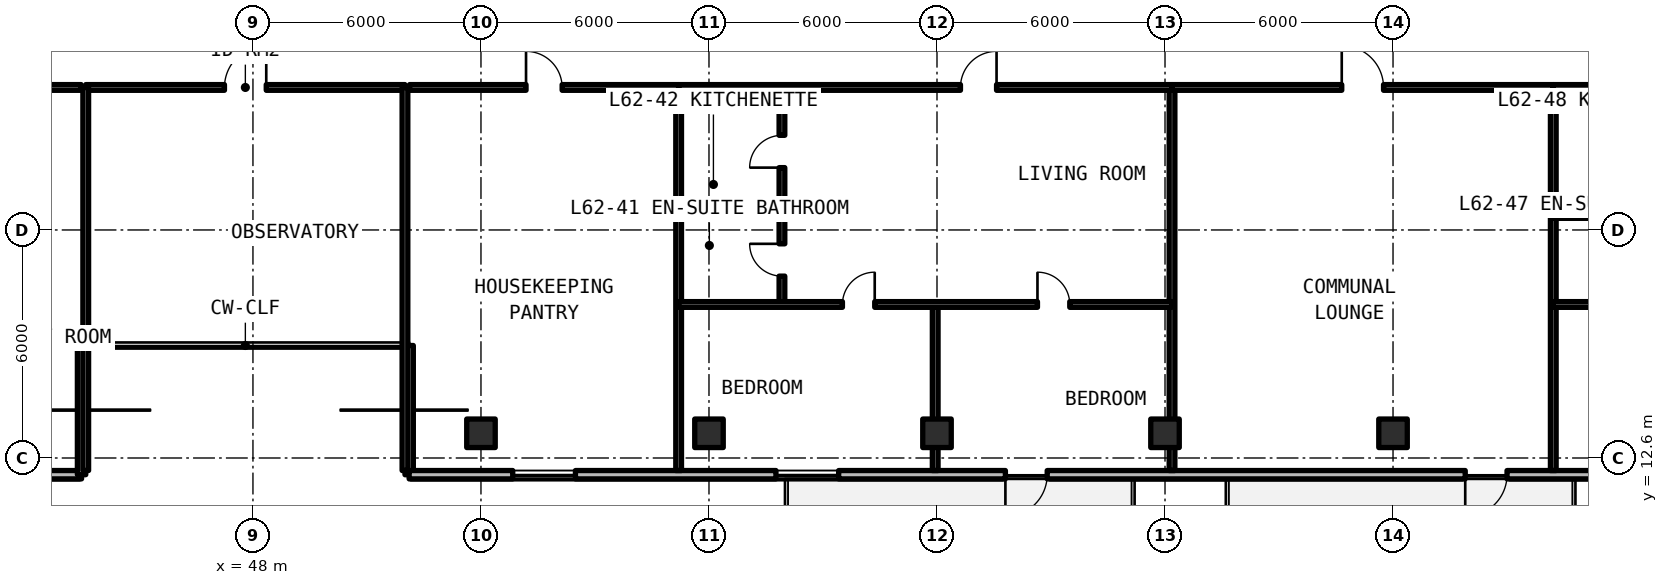
"""IFC4 building model, lengths in metres.
Left out: names, types, materials, properties, quantities, classifications, styles, units other than length and angle.
Written with IfcOpenShell. Run it as: python <this file> out.ifc"""

import sys

from ifc_helpers import new_model, si_unit, direction, frame, frame_2d, origin, origin_2d, place, context, subcontext, project, spatial, rectangle, extrude, element, fill, save


model = new_model("IFC4")
c1 = context("Model", 3, precision=1e-05, world=origin(), true_north=direction((0.0, 1.0)))
c2 = subcontext(c1, "Body", "Model", "MODEL_VIEW")
j1 = project(units=[si_unit("LENGTHUNIT", "METRE"), si_unit("PLANEANGLEUNIT", "RADIAN")], contexts=[c1])
p1 = place(None, origin())
s1 = spatial("IfcSite", under=j1, at=p1, CompositionType="ELEMENT")
p2 = place(p1, origin())
s2 = spatial("IfcBuilding", under=s1, at=p2, CompositionType="ELEMENT")
p3 = place(p2, frame((0.0, 0.0, 222.75)))
s3 = spatial("IfcBuildingStorey", under=s2, at=p3, CompositionType="ELEMENT", Elevation=222.75)
for number, where, z_axis, x_axis in (
    (1, (54.0, 13.25, 0.0), (0.0, 0.0, 1.0), (1.0, 0.0, 0.0)),
    (2, (60.0, 13.25, 0.0), (0.0, 0.0, 1.0), (1.0, 0.0, 0.0)),
    (3, (66.0, 13.25, 0.0), (0.0, 0.0, 1.0), (1.0, 0.0, 0.0)),
    (4, (72.0, 13.25, 0.0), (0.0, 0.0, 1.0), (1.0, 0.0, 0.0)),
    (5, (78.0, 13.25, 0.0), (0.0, 0.0, 1.0), (1.0, 0.0, 0.0)),
):
    element("IfcColumn", number, at=place(p3, frame(where, z_axis=z_axis, x_axis=x_axis)), inside=s3, PredefinedType="COLUMN", context=c2, shape_type="SweptSolid", body=[
        extrude(rectangle(XDim=0.75, YDim=0.75, at=origin_2d()), origin(), (0.0, 0.0, 1.0), 3.3),
    ])
p4 = place(p3, frame((25.846, 12.16, 0.0), z_axis=(0.0, 0.0, 1.0), x_axis=(1.0, 0.0, 0.0)))
e6 = element("IfcWall", 6, at=p4, inside=s3, PredefinedType="SOLIDWALL", context=c2, shape_type="SweptSolid", body=[
    extrude(rectangle(XDim=17.644, YDim=0.22, at=frame_2d((8.822, 0.0))), origin(), (0.0, 0.0, 1.0), 3.08),
])
p5 = place(p4, frame((5.904, 0.0, 0.0)))
e7 = element("IfcOpeningElement", 7, at=p5, cuts=e6, PredefinedType="OPENING", context=c2, shape_type="SweptSolid", body=[
    extrude(rectangle(XDim=1.1, YDim=2.15, at=frame_2d((0.55, 1.075))), frame((0.0, 0.12, 0.0), z_axis=(0.0, -1.0, 0.0), x_axis=(1.0, 0.0, 0.0)), (0.0, 0.0, 1.0), 0.24),
])
p6 = place(p4, frame((1.261, 0.0, 0.78)))
e8 = element("IfcOpeningElement", 8, at=p6, cuts=e6, PredefinedType="OPENING", context=c2, shape_type="SweptSolid", body=[
    extrude(rectangle(XDim=1.65, YDim=1.66, at=frame_2d((0.825, 0.83))), frame((0.0, 0.12, 0.0), z_axis=(0.0, -1.0, 0.0), x_axis=(1.0, 0.0, 0.0)), (0.0, 0.0, 1.0), 0.24),
])
p7 = place(p4, frame((11.45, 0.0, 0.78)))
e9 = element("IfcOpeningElement", 9, at=p7, cuts=e6, PredefinedType="OPENING", context=c2, shape_type="SweptSolid", body=[
    extrude(rectangle(XDim=1.65, YDim=1.66, at=frame_2d((0.825, 0.83))), frame((0.0, 0.12, 0.0), z_axis=(0.0, -1.0, 0.0), x_axis=(1.0, 0.0, 0.0)), (0.0, 0.0, 1.0), 0.24),
])
p8 = place(p4, frame((14.602, 0.0, 0.78)))
e10 = element("IfcOpeningElement", 10, at=p8, cuts=e6, PredefinedType="OPENING", context=c2, shape_type="SweptSolid", body=[
    extrude(rectangle(XDim=0.85, YDim=1.65, at=frame_2d((0.425, 0.825))), frame((0.0, 0.12, 0.0), z_axis=(0.0, -1.0, 0.0), x_axis=(1.0, 0.0, 0.0)), (0.0, 0.0, 1.0), 0.24),
])
for number, where, z_axis, x_axis in (
    (11, (43.49, 12.16, 0.0), (0.0, 0.0, 1.0), (0.0, 1.0, 0.0)),
    (12, (52.11, 15.56, 0.0), (0.0, 0.0, 1.0), (0.0, -1.0, 0.0)),
):
    element("IfcWall", number, at=place(p3, frame(where, z_axis=z_axis, x_axis=x_axis)), inside=s3, PredefinedType="SOLIDWALL", context=c2, shape_type="SweptSolid", body=[
        extrude(rectangle(XDim=3.4, YDim=0.22, at=frame_2d((1.7, 0.0))), origin(), (0.0, 0.0, 1.0), 3.08),
    ])
p9 = place(p3, frame((52.11, 12.16, 0.0), z_axis=(0.0, 0.0, 1.0), x_axis=(1.0, 0.0, 0.0)))
e13 = element("IfcWall", 13, at=p9, inside=s3, PredefinedType="SOLIDWALL", context=c2, shape_type="SweptSolid", body=[
    extrude(rectangle(XDim=43.244, YDim=0.22, at=frame_2d((21.622, 0.0))), origin(), (0.0, 0.0, 1.0), 3.08),
])
p10 = place(p9, frame((15.69, 0.0, 0.0)))
e14 = element("IfcOpeningElement", 14, at=p10, cuts=e13, PredefinedType="OPENING", context=c2, shape_type="SweptSolid", body=[
    extrude(rectangle(XDim=1.1, YDim=2.15, at=frame_2d((0.55, 1.075))), frame((0.0, 0.12, 0.0), z_axis=(0.0, -1.0, 0.0), x_axis=(1.0, 0.0, 0.0)), (0.0, 0.0, 1.0), 0.24),
])
p11 = place(p9, frame((27.79, 0.0, 0.0)))
e15 = element("IfcOpeningElement", 15, at=p11, cuts=e13, PredefinedType="OPENING", context=c2, shape_type="SweptSolid", body=[
    extrude(rectangle(XDim=1.1, YDim=2.15, at=frame_2d((0.55, 1.075))), frame((0.0, 0.12, 0.0), z_axis=(0.0, -1.0, 0.0), x_axis=(1.0, 0.0, 0.0)), (0.0, 0.0, 1.0), 0.24),
])
p12 = place(p9, frame((2.726, 0.0, 0.78)))
e16 = element("IfcOpeningElement", 16, at=p12, cuts=e13, PredefinedType="OPENING", context=c2, shape_type="SweptSolid", body=[
    extrude(rectangle(XDim=1.65, YDim=1.66, at=frame_2d((0.825, 0.83))), frame((0.0, 0.12, 0.0), z_axis=(0.0, -1.0, 0.0), x_axis=(1.0, 0.0, 0.0)), (0.0, 0.0, 1.0), 0.24),
])
p13 = place(p9, frame((9.652, 0.0, 0.78)))
e17 = element("IfcOpeningElement", 17, at=p13, cuts=e13, PredefinedType="OPENING", context=c2, shape_type="SweptSolid", body=[
    extrude(rectangle(XDim=1.65, YDim=1.66, at=frame_2d((0.825, 0.83))), frame((0.0, 0.12, 0.0), z_axis=(0.0, -1.0, 0.0), x_axis=(1.0, 0.0, 0.0)), (0.0, 0.0, 1.0), 0.24),
])
p14 = place(p9, frame((32.667, 0.0, 0.78)))
e18 = element("IfcOpeningElement", 18, at=p14, cuts=e13, PredefinedType="OPENING", context=c2, shape_type="SweptSolid", body=[
    extrude(rectangle(XDim=1.65, YDim=1.66, at=frame_2d((0.825, 0.83))), frame((0.0, 0.12, 0.0), z_axis=(0.0, -1.0, 0.0), x_axis=(1.0, 0.0, 0.0)), (0.0, 0.0, 1.0), 0.24),
])
p15 = place(p9, frame((39.139, 0.0, 0.78)))
e19 = element("IfcOpeningElement", 19, at=p15, cuts=e13, PredefinedType="OPENING", context=c2, shape_type="SweptSolid", body=[
    extrude(rectangle(XDim=1.65, YDim=1.66, at=frame_2d((0.825, 0.83))), frame((0.0, 0.12, 0.0), z_axis=(0.0, -1.0, 0.0), x_axis=(1.0, 0.0, 0.0)), (0.0, 0.0, 1.0), 0.24),
])
p16 = place(p3, frame((43.6, 22.35, 0.0), z_axis=(0.0, 0.0, 1.0), x_axis=(1.0, 0.0, 0.0)))
e20 = element("IfcWall", 20, at=p16, inside=s3, PredefinedType="SOLIDWALL", context=c2, shape_type="SweptSolid", body=[
    extrude(rectangle(XDim=8.4, YDim=0.15, at=frame_2d((4.2, 0.0))), origin(), (0.0, 0.0, 1.0), 2.35),
])
p17 = place(p16, frame((3.65, 0.0, 0.0)))
e21 = element("IfcOpeningElement", 21, at=p17, cuts=e20, PredefinedType="OPENING", context=c2, shape_type="SweptSolid", body=[
    extrude(rectangle(XDim=1.1, YDim=2.15, at=frame_2d((0.55, 1.075))), frame((0.0, 0.085, 0.0), z_axis=(0.0, -1.0, 0.0), x_axis=(1.0, 0.0, 0.0)), (0.0, 0.0, 1.0), 0.17),
])
for number, where, z_axis, x_axis in (
    (22, (43.6, 12.27, 0.0), (0.0, 0.0, 1.0), (0.0, 1.0, 0.0)),
    (23, (52.0, 12.27, 0.0), (0.0, 0.0, 1.0), (0.0, 1.0, 0.0)),
):
    element("IfcWall", number, at=place(p3, frame(where, z_axis=z_axis, x_axis=x_axis)), inside=s3, PredefinedType="SOLIDWALL", context=c2, shape_type="SweptSolid", body=[
        extrude(rectangle(XDim=10.08, YDim=0.15, at=frame_2d((5.04, 0.0))), origin(), (0.0, 0.0, 1.0), 2.35),
    ])
p18 = place(p3, frame((39.866, 22.35, 0.0), z_axis=(0.0, 0.0, 1.0), x_axis=(1.0, 0.0, 0.0)))
e24 = element("IfcWall", 24, at=p18, inside=s3, PredefinedType="SOLIDWALL", context=c2, shape_type="SweptSolid", body=[
    extrude(rectangle(XDim=3.614, YDim=0.15, at=frame_2d((1.807, 0.0))), origin(), (0.0, 0.0, 1.0), 2.35),
])
p19 = place(p18, frame((1.332, 0.0, 0.0)))
e25 = element("IfcOpeningElement", 25, at=p19, cuts=e24, PredefinedType="OPENING", context=c2, shape_type="SweptSolid", body=[
    extrude(rectangle(XDim=0.95, YDim=2.15, at=frame_2d((0.475, 1.075))), frame((0.0, 0.085, 0.0), z_axis=(0.0, -1.0, 0.0), x_axis=(1.0, 0.0, 0.0)), (0.0, 0.0, 1.0), 0.17),
])
p20 = place(p3, frame((59.202, 12.27, 0.0), z_axis=(0.0, 0.0, 1.0), x_axis=(0.0, 1.0, 0.0)))
e26 = element("IfcWall", 26, at=p20, inside=s3, PredefinedType="SOLIDWALL", context=c2, shape_type="SweptSolid", body=[
    extrude(rectangle(XDim=10.08, YDim=0.15, at=frame_2d((5.04, 0.0))), origin(), (0.0, 0.0, 1.0), 2.35),
])
p21 = place(p3, frame((52.12, 22.35, 0.0), z_axis=(0.0, 0.0, 1.0), x_axis=(1.0, 0.0, 0.0)))
e27 = element("IfcWall", 27, at=p21, inside=s3, PredefinedType="SOLIDWALL", context=c2, shape_type="SweptSolid", body=[
    extrude(rectangle(XDim=7.082, YDim=0.15, at=frame_2d((3.541, 0.0))), origin(), (0.0, 0.0, 1.0), 2.35),
])
p22 = place(p21, frame((3.066, 0.0, 0.0)))
e28 = element("IfcOpeningElement", 28, at=p22, cuts=e27, PredefinedType="OPENING", context=c2, shape_type="SweptSolid", body=[
    extrude(rectangle(XDim=0.95, YDim=2.15, at=frame_2d((0.475, 1.075))), frame((0.0, 0.085, 0.0), z_axis=(0.0, -1.0, 0.0), x_axis=(1.0, 0.0, 0.0)), (0.0, 0.0, 1.0), 0.17),
])
p23 = place(p3, frame((72.185, 12.27, 0.0), z_axis=(0.0, 0.0, 1.0), x_axis=(0.0, 1.0, 0.0)))
e29 = element("IfcWall", 29, at=p23, inside=s3, PredefinedType="SOLIDWALL", context=c2, shape_type="SweptSolid", body=[
    extrude(rectangle(XDim=10.08, YDim=0.15, at=frame_2d((5.04, 0.0))), origin(), (0.0, 0.0, 1.0), 2.35),
])
p24 = place(p3, frame((59.202, 18.981, 0.0), z_axis=(0.0, 0.0, 1.0), x_axis=(1.0, 0.0, 0.0)))
e30 = element("IfcWall", 30, at=p24, inside=s3, PredefinedType="PARTITIONING", context=c2, shape_type="SweptSolid", body=[
    extrude(rectangle(XDim=2.718, YDim=0.15, at=frame_2d((1.359, 0.0))), origin(), (0.0, 0.0, 1.0), 2.35),
])
p25 = place(p3, frame((61.92, 16.64, 0.0), z_axis=(0.0, 0.0, 1.0), x_axis=(0.0, 1.0, 0.0)))
e31 = element("IfcWall", 31, at=p25, inside=s3, PredefinedType="PARTITIONING", context=c2, shape_type="SweptSolid", body=[
    extrude(rectangle(XDim=5.71, YDim=0.15, at=frame_2d((2.855, 0.0))), origin(), (0.0, 0.0, 1.0), 2.35),
])
p26 = place(p25, frame((0.746, 0.0, 0.0)))
e32 = element("IfcOpeningElement", 32, at=p26, cuts=e31, PredefinedType="OPENING", context=c2, shape_type="SweptSolid", body=[
    extrude(rectangle(XDim=0.85, YDim=2.1, at=frame_2d((0.425, 1.05))), frame((0.0, 0.085, 0.0), z_axis=(0.0, -1.0, 0.0), x_axis=(1.0, 0.0, 0.0)), (0.0, 0.0, 1.0), 0.17),
])
p27 = place(p25, frame((3.601, 0.0, 0.0)))
e33 = element("IfcOpeningElement", 33, at=p27, cuts=e31, PredefinedType="OPENING", context=c2, shape_type="SweptSolid", body=[
    extrude(rectangle(XDim=0.85, YDim=2.1, at=frame_2d((0.425, 1.05))), frame((0.0, 0.085, 0.0), z_axis=(0.0, -1.0, 0.0), x_axis=(1.0, 0.0, 0.0)), (0.0, 0.0, 1.0), 0.17),
])
p28 = place(p3, frame((65.953, 12.27, 0.0), z_axis=(0.0, 0.0, 1.0), x_axis=(0.0, 1.0, 0.0)))
e34 = element("IfcWall", 34, at=p28, inside=s3, PredefinedType="PARTITIONING", context=c2, shape_type="SweptSolid", body=[
    extrude(rectangle(XDim=4.37, YDim=0.15, at=frame_2d((2.185, 0.0))), origin(), (0.0, 0.0, 1.0), 2.35),
])
p29 = place(p3, frame((59.202, 16.64, 0.0), z_axis=(0.0, 0.0, 1.0), x_axis=(1.0, 0.0, 0.0)))
e35 = element("IfcWall", 35, at=p29, inside=s3, PredefinedType="PARTITIONING", context=c2, shape_type="SweptSolid", body=[
    extrude(rectangle(XDim=12.983, YDim=0.15, at=frame_2d((6.491, 0.0))), origin(), (0.0, 0.0, 1.0), 2.35),
])
p30 = place(p29, frame((4.31, 0.0, 0.0)))
e36 = element("IfcOpeningElement", 36, at=p30, cuts=e35, PredefinedType="OPENING", context=c2, shape_type="SweptSolid", body=[
    extrude(rectangle(XDim=0.85, YDim=2.1, at=frame_2d((0.425, 1.05))), frame((0.0, 0.085, 0.0), z_axis=(0.0, -1.0, 0.0), x_axis=(1.0, 0.0, 0.0)), (0.0, 0.0, 1.0), 0.17),
])
p31 = place(p29, frame((9.442, 0.0, 0.0)))
e37 = element("IfcOpeningElement", 37, at=p31, cuts=e35, PredefinedType="OPENING", context=c2, shape_type="SweptSolid", body=[
    extrude(rectangle(XDim=0.85, YDim=2.1, at=frame_2d((0.425, 1.05))), frame((0.0, 0.085, 0.0), z_axis=(0.0, -1.0, 0.0), x_axis=(1.0, 0.0, 0.0)), (0.0, 0.0, 1.0), 0.17),
])
p32 = place(p3, frame((59.202, 22.35, 0.0), z_axis=(0.0, 0.0, 1.0), x_axis=(1.0, 0.0, 0.0)))
e38 = element("IfcWall", 38, at=p32, inside=s3, PredefinedType="SOLIDWALL", context=c2, shape_type="SweptSolid", body=[
    extrude(rectangle(XDim=12.983, YDim=0.15, at=frame_2d((6.491, 0.0))), origin(), (0.0, 0.0, 1.0), 2.35),
])
p33 = place(p32, frame((7.416, 0.0, 0.0)))
e39 = element("IfcOpeningElement", 39, at=p33, cuts=e38, PredefinedType="OPENING", context=c2, shape_type="SweptSolid", body=[
    extrude(rectangle(XDim=0.95, YDim=2.15, at=frame_2d((0.475, 1.075))), frame((0.0, 0.085, 0.0), z_axis=(0.0, -1.0, 0.0), x_axis=(1.0, 0.0, 0.0)), (0.0, 0.0, 1.0), 0.17),
])
p34 = place(p3, frame((82.217, 12.27, 0.0), z_axis=(0.0, 0.0, 1.0), x_axis=(0.0, 1.0, 0.0)))
e40 = element("IfcWall", 40, at=p34, inside=s3, PredefinedType="SOLIDWALL", context=c2, shape_type="SweptSolid", body=[
    extrude(rectangle(XDim=10.08, YDim=0.15, at=frame_2d((5.04, 0.0))), origin(), (0.0, 0.0, 1.0), 2.35),
])
p35 = place(p3, frame((72.185, 22.35, 0.0), z_axis=(0.0, 0.0, 1.0), x_axis=(1.0, 0.0, 0.0)))
e41 = element("IfcWall", 41, at=p35, inside=s3, PredefinedType="SOLIDWALL", context=c2, shape_type="SweptSolid", body=[
    extrude(rectangle(XDim=10.032, YDim=0.15, at=frame_2d((5.016, 0.0))), origin(), (0.0, 0.0, 1.0), 2.35),
])
p36 = place(p35, frame((4.466, 0.0, 0.0)))
e42 = element("IfcOpeningElement", 42, at=p36, cuts=e41, PredefinedType="OPENING", context=c2, shape_type="SweptSolid", body=[
    extrude(rectangle(XDim=1.1, YDim=2.15, at=frame_2d((0.55, 1.075))), frame((0.0, 0.085, 0.0), z_axis=(0.0, -1.0, 0.0), x_axis=(1.0, 0.0, 0.0)), (0.0, 0.0, 1.0), 0.17),
])
p37 = place(p3, frame((82.217, 18.981, 0.0), z_axis=(0.0, 0.0, 1.0), x_axis=(1.0, 0.0, 0.0)))
e43 = element("IfcWall", 43, at=p37, inside=s3, PredefinedType="PARTITIONING", context=c2, shape_type="SweptSolid", body=[
    extrude(rectangle(XDim=3.703, YDim=0.15, at=frame_2d((1.852, 0.0))), origin(), (0.0, 0.0, 1.0), 2.35),
])
p38 = place(p3, frame((82.217, 16.64, 0.0), z_axis=(0.0, 0.0, 1.0), x_axis=(1.0, 0.0, 0.0)))
e44 = element("IfcWall", 44, at=p38, inside=s3, PredefinedType="PARTITIONING", context=c2, shape_type="SweptSolid", body=[
    extrude(rectangle(XDim=12.983, YDim=0.15, at=frame_2d((6.492, 0.0))), origin(), (0.0, 0.0, 1.0), 2.35),
])
p39 = place(p38, frame((4.802, 0.0, 0.0)))
e45 = element("IfcOpeningElement", 45, at=p39, cuts=e44, PredefinedType="OPENING", context=c2, shape_type="SweptSolid", body=[
    extrude(rectangle(XDim=0.85, YDim=2.1, at=frame_2d((0.425, 1.05))), frame((0.0, 0.085, 0.0), z_axis=(0.0, -1.0, 0.0), x_axis=(1.0, 0.0, 0.0)), (0.0, 0.0, 1.0), 0.17),
])
p40 = place(p38, frame((9.442, 0.0, 0.0)))
e46 = element("IfcOpeningElement", 46, at=p40, cuts=e44, PredefinedType="OPENING", context=c2, shape_type="SweptSolid", body=[
    extrude(rectangle(XDim=0.85, YDim=2.1, at=frame_2d((0.425, 1.05))), frame((0.0, 0.085, 0.0), z_axis=(0.0, -1.0, 0.0), x_axis=(1.0, 0.0, 0.0)), (0.0, 0.0, 1.0), 0.17),
])
p41 = place(p3, frame((82.217, 22.35, 0.0), z_axis=(0.0, 0.0, 1.0), x_axis=(1.0, 0.0, 0.0)))
e47 = element("IfcWall", 47, at=p41, inside=s3, PredefinedType="SOLIDWALL", context=c2, shape_type="SweptSolid", body=[
    extrude(rectangle(XDim=12.983, YDim=0.15, at=frame_2d((6.492, 0.0))), origin(), (0.0, 0.0, 1.0), 2.35),
])
p42 = place(p41, frame((7.908, 0.0, 0.0)))
e48 = element("IfcOpeningElement", 48, at=p42, cuts=e47, PredefinedType="OPENING", context=c2, shape_type="SweptSolid", body=[
    extrude(rectangle(XDim=0.95, YDim=2.15, at=frame_2d((0.475, 1.075))), frame((0.0, 0.085, 0.0), z_axis=(0.0, -1.0, 0.0), x_axis=(1.0, 0.0, 0.0)), (0.0, 0.0, 1.0), 0.17),
])
p43 = place(p10, frame((1.1, 0.0, 0.0), z_axis=(0.0, 0.0, 1.0), x_axis=(-1.0, 0.0, 0.0)))
e49 = element("IfcDoor", 49, at=p43, inside=s3, OperationType="SINGLE_SWING_RIGHT", PredefinedType="DOOR", context=c2, shape_type="SweptSolid", body=[
    extrude(rectangle(XDim=1.1, YDim=2.15, at=frame_2d((0.55, 1.075))), frame((0.0, 0.025, 0.0), z_axis=(0.0, -1.0, 0.0), x_axis=(1.0, 0.0, 0.0)), (0.0, 0.0, 1.0), 0.05),
])
fill(e14, e49)
p44 = place(p11, frame((1.1, 0.0, 0.0), z_axis=(0.0, 0.0, 1.0), x_axis=(-1.0, 0.0, 0.0)))
e50 = element("IfcDoor", 50, at=p44, inside=s3, OperationType="SINGLE_SWING_LEFT", PredefinedType="DOOR", context=c2, shape_type="SweptSolid", body=[
    extrude(rectangle(XDim=1.1, YDim=2.15, at=frame_2d((0.55, 1.075))), frame((0.0, 0.025, 0.0), z_axis=(0.0, -1.0, 0.0), x_axis=(1.0, 0.0, 0.0)), (0.0, 0.0, 1.0), 0.05),
])
fill(e15, e50)
p45 = place(p12, origin())
e51 = element("IfcWindow", 51, at=p45, inside=s3, PartitioningType="SINGLE_PANEL", PredefinedType="WINDOW", context=c2, shape_type="SweptSolid", body=[
    extrude(rectangle(XDim=1.65, YDim=1.66, at=frame_2d((0.825, 0.83))), frame((0.0, 0.03, 0.0), z_axis=(0.0, -1.0, 0.0), x_axis=(1.0, 0.0, 0.0)), (0.0, 0.0, 1.0), 0.06),
])
fill(e16, e51)
p46 = place(p13, origin())
e52 = element("IfcWindow", 52, at=p46, inside=s3, PartitioningType="SINGLE_PANEL", PredefinedType="WINDOW", context=c2, shape_type="SweptSolid", body=[
    extrude(rectangle(XDim=1.65, YDim=1.66, at=frame_2d((0.825, 0.83))), frame((0.0, 0.03, 0.0), z_axis=(0.0, -1.0, 0.0), x_axis=(1.0, 0.0, 0.0)), (0.0, 0.0, 1.0), 0.06),
])
fill(e17, e52)
p47 = place(p17, origin())
e53 = element("IfcDoor", 53, at=p47, inside=s3, OperationType="SINGLE_SWING_RIGHT", PredefinedType="DOOR", context=c2, shape_type="SweptSolid", body=[
    extrude(rectangle(XDim=1.1, YDim=2.15, at=frame_2d((0.55, 1.075))), frame((0.0, 0.025, 0.0), z_axis=(0.0, -1.0, 0.0), x_axis=(1.0, 0.0, 0.0)), (0.0, 0.0, 1.0), 0.05),
])
fill(e21, e53)
p48 = place(p22, origin())
e54 = element("IfcDoor", 54, at=p48, inside=s3, OperationType="SINGLE_SWING_LEFT", PredefinedType="DOOR", context=c2, shape_type="SweptSolid", body=[
    extrude(rectangle(XDim=0.95, YDim=2.15, at=frame_2d((0.475, 1.075))), frame((0.0, 0.025, 0.0), z_axis=(0.0, -1.0, 0.0), x_axis=(1.0, 0.0, 0.0)), (0.0, 0.0, 1.0), 0.05),
])
fill(e28, e54)
p49 = place(p26, origin())
e55 = element("IfcDoor", 55, at=p49, inside=s3, OperationType="SINGLE_SWING_RIGHT", PredefinedType="DOOR", context=c2, shape_type="SweptSolid", body=[
    extrude(rectangle(XDim=0.85, YDim=2.1, at=frame_2d((0.425, 1.05))), frame((0.0, 0.025, 0.0), z_axis=(0.0, -1.0, 0.0), x_axis=(1.0, 0.0, 0.0)), (0.0, 0.0, 1.0), 0.05),
])
fill(e32, e55)
p50 = place(p27, origin())
e56 = element("IfcDoor", 56, at=p50, inside=s3, OperationType="SINGLE_SWING_LEFT", PredefinedType="DOOR", context=c2, shape_type="SweptSolid", body=[
    extrude(rectangle(XDim=0.85, YDim=2.1, at=frame_2d((0.425, 1.05))), frame((0.0, 0.025, 0.0), z_axis=(0.0, -1.0, 0.0), x_axis=(1.0, 0.0, 0.0)), (0.0, 0.0, 1.0), 0.05),
])
fill(e33, e56)
p51 = place(p30, origin())
e57 = element("IfcDoor", 57, at=p51, inside=s3, OperationType="SINGLE_SWING_RIGHT", PredefinedType="DOOR", context=c2, shape_type="SweptSolid", body=[
    extrude(rectangle(XDim=0.85, YDim=2.1, at=frame_2d((0.425, 1.05))), frame((0.0, 0.025, 0.0), z_axis=(0.0, -1.0, 0.0), x_axis=(1.0, 0.0, 0.0)), (0.0, 0.0, 1.0), 0.05),
])
fill(e36, e57)
p52 = place(p31, origin())
e58 = element("IfcDoor", 58, at=p52, inside=s3, OperationType="SINGLE_SWING_LEFT", PredefinedType="DOOR", context=c2, shape_type="SweptSolid", body=[
    extrude(rectangle(XDim=0.85, YDim=2.1, at=frame_2d((0.425, 1.05))), frame((0.0, 0.025, 0.0), z_axis=(0.0, -1.0, 0.0), x_axis=(1.0, 0.0, 0.0)), (0.0, 0.0, 1.0), 0.05),
])
fill(e37, e58)
p53 = place(p33, origin())
e59 = element("IfcDoor", 59, at=p53, inside=s3, OperationType="SINGLE_SWING_RIGHT", PredefinedType="DOOR", context=c2, shape_type="SweptSolid", body=[
    extrude(rectangle(XDim=0.95, YDim=2.15, at=frame_2d((0.475, 1.075))), frame((0.0, 0.025, 0.0), z_axis=(0.0, -1.0, 0.0), x_axis=(1.0, 0.0, 0.0)), (0.0, 0.0, 1.0), 0.05),
])
fill(e39, e59)
p54 = place(p36, origin())
e60 = element("IfcDoor", 60, at=p54, inside=s3, OperationType="SINGLE_SWING_LEFT", PredefinedType="DOOR", context=c2, shape_type="SweptSolid", body=[
    extrude(rectangle(XDim=1.1, YDim=2.15, at=frame_2d((0.55, 1.075))), frame((0.0, 0.025, 0.0), z_axis=(0.0, -1.0, 0.0), x_axis=(1.0, 0.0, 0.0)), (0.0, 0.0, 1.0), 0.05),
])
fill(e42, e60)
save(model, sys.argv[1])
